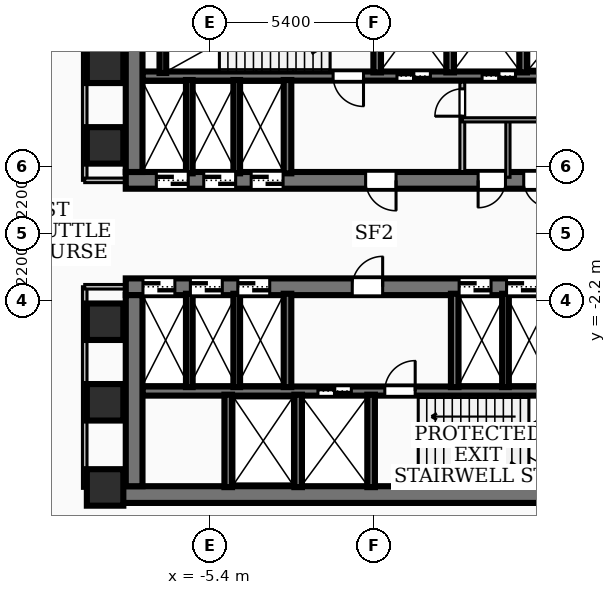
"""IFC4 building model, lengths in metres.
Left out: names, types, materials, properties, quantities, classifications, styles, units other than length and angle.
Written with IfcOpenShell. Run it as: python <this file> out.ifc"""

import sys

from ifc_helpers import new_model, si_unit, direction, frame, frame_2d, origin, origin_2d, place, context, subcontext, project, spatial, rectangle, extrude, element, fill, save


model = new_model("IFC4")
c1 = context("Model", 3, precision=1e-05, world=origin(), true_north=direction((0.0, 1.0)))
c2 = subcontext(c1, "Body", "Model", "MODEL_VIEW")
j1 = project(units=[si_unit("LENGTHUNIT", "METRE"), si_unit("PLANEANGLEUNIT", "RADIAN")], contexts=[c1])
p1 = place(None, origin())
s1 = spatial("IfcSite", under=j1, at=p1, CompositionType="ELEMENT")
p2 = place(p1, origin())
s2 = spatial("IfcBuilding", under=s1, at=p2, CompositionType="ELEMENT")
p3 = place(p2, frame((0.0, 0.0, 19.44)))
s3 = spatial("IfcBuildingStorey", under=s2, at=p3, CompositionType="ELEMENT", Elevation=19.44)
p4 = place(p3, frame((8.17, 1.75, 0.0), z_axis=(0.0, 0.0, 1.0), x_axis=(-1.0, 0.0, 0.0)))
e1 = element("IfcWall", 1, at=p4, inside=s3, PredefinedType="SHEAR", context=c2, shape_type="SweptSolid", body=[
    extrude(rectangle(XDim=16.34, YDim=0.55, at=frame_2d((8.17, 0.0))), origin(), (0.0, 0.0, 1.0), 4.78),
])
p5 = place(p4, frame((7.45, 0.0, 0.0)))
e2 = element("IfcOpeningElement", 2, at=p5, cuts=e1, PredefinedType="OPENING", context=c2, shape_type="SweptSolid", body=[
    extrude(rectangle(XDim=1.0, YDim=2.1, at=frame_2d((0.5, 1.05))), frame((0.0, 0.285, 0.0), z_axis=(0.0, -1.0, 0.0), x_axis=(1.0, 0.0, 0.0)), (0.0, 0.0, 1.0), 0.57),
])
p6 = place(p4, frame((14.285, 0.0, 0.0)))
e3 = element("IfcOpeningElement", 3, at=p6, cuts=e1, PredefinedType="OPENING", context=c2, shape_type="SweptSolid", body=[
    extrude(rectangle(XDim=1.05, YDim=2.15, at=frame_2d((0.525, 1.075))), frame((0.0, 0.285, 0.0), z_axis=(0.0, -1.0, 0.0), x_axis=(1.0, 0.0, 0.0)), (0.0, 0.0, 1.0), 0.57),
])
p7 = place(p4, frame((12.725, 0.0, 0.0)))
e4 = element("IfcOpeningElement", 4, at=p7, cuts=e1, PredefinedType="OPENING", context=c2, shape_type="SweptSolid", body=[
    extrude(rectangle(XDim=1.05, YDim=2.15, at=frame_2d((0.525, 1.075))), frame((0.0, 0.285, 0.0), z_axis=(0.0, -1.0, 0.0), x_axis=(1.0, 0.0, 0.0)), (0.0, 0.0, 1.0), 0.57),
])
p8 = place(p4, frame((11.165, 0.0, 0.0)))
e5 = element("IfcOpeningElement", 5, at=p8, cuts=e1, PredefinedType="OPENING", context=c2, shape_type="SweptSolid", body=[
    extrude(rectangle(XDim=1.05, YDim=2.15, at=frame_2d((0.525, 1.075))), frame((0.0, 0.285, 0.0), z_axis=(0.0, -1.0, 0.0), x_axis=(1.0, 0.0, 0.0)), (0.0, 0.0, 1.0), 0.57),
])
p9 = place(p4, frame((3.85, 0.0, 0.0)))
e6 = element("IfcOpeningElement", 6, at=p9, cuts=e1, PredefinedType="OPENING", context=c2, shape_type="SweptSolid", body=[
    extrude(rectangle(XDim=0.9, YDim=2.06, at=frame_2d((0.45, 1.03))), frame((0.0, 0.285, 0.0), z_axis=(0.0, -1.0, 0.0), x_axis=(1.0, 0.0, 0.0)), (0.0, 0.0, 1.0), 0.57),
])
p10 = place(p4, frame((2.35, 0.0, 0.0)))
e7 = element("IfcOpeningElement", 7, at=p10, cuts=e1, PredefinedType="OPENING", context=c2, shape_type="SweptSolid", body=[
    extrude(rectangle(XDim=0.9, YDim=2.06, at=frame_2d((0.45, 1.03))), frame((0.0, 0.285, 0.0), z_axis=(0.0, -1.0, 0.0), x_axis=(1.0, 0.0, 0.0)), (0.0, 0.0, 1.0), 0.57),
])
p11 = place(p4, frame((0.8, 0.0, 0.0)))
e8 = element("IfcOpeningElement", 8, at=p11, cuts=e1, PredefinedType="OPENING", context=c2, shape_type="SweptSolid", body=[
    extrude(rectangle(XDim=0.9, YDim=2.06, at=frame_2d((0.45, 1.03))), frame((0.0, 0.285, 0.0), z_axis=(0.0, -1.0, 0.0), x_axis=(1.0, 0.0, 0.0)), (0.0, 0.0, 1.0), 0.57),
])
p12 = place(p3, frame((-7.895, 2.025, 0.0), z_axis=(0.0, 0.0, 1.0), x_axis=(0.0, 1.0, 0.0)))
e9 = element("IfcWall", 9, at=p12, inside=s3, PredefinedType="SHEAR", context=c2, shape_type="SweptSolid", body=[
    extrude(rectangle(XDim=6.285, YDim=0.55, at=frame_2d((3.143, 0.0))), origin(), (0.0, 0.0, 1.0), 4.78),
])
p13 = place(p3, frame((7.62, 5.18, 0.0), z_axis=(0.0, 0.0, 1.0), x_axis=(-1.0, 0.0, 0.0)))
e10 = element("IfcWall", 10, at=p13, inside=s3, PredefinedType="SOLIDWALL", context=c2, shape_type="SweptSolid", body=[
    extrude(rectangle(XDim=15.24, YDim=0.3, at=frame_2d((7.62, 0.0))), origin(), (0.0, 0.0, 1.0), 4.78),
])
p14 = place(p13, frame((5.77, 0.0, 0.0)))
e11 = element("IfcOpeningElement", 11, at=p14, cuts=e10, PredefinedType="OPENING", context=c2, shape_type="SweptSolid", body=[
    extrude(rectangle(XDim=1.1, YDim=2.15, at=frame_2d((0.55, 1.075))), frame((0.0, 0.16, 0.0), z_axis=(0.0, -1.0, 0.0), x_axis=(1.0, 0.0, 0.0)), (0.0, 0.0, 1.0), 0.32),
])
p15 = place(p13, frame((2.97, 0.0, 0.0)))
e12 = element("IfcOpeningElement", 12, at=p15, cuts=e10, PredefinedType="OPENING", context=c2, shape_type="SweptSolid", body=[
    extrude(rectangle(XDim=1.1, YDim=2.15, at=frame_2d((0.55, 1.075))), frame((0.0, 0.16, 0.0), z_axis=(0.0, -1.0, 0.0), x_axis=(1.0, 0.0, 0.0)), (0.0, 0.0, 1.0), 0.32),
])
p16 = place(p13, frame((7.97, 0.0, 0.0)))
e13 = element("IfcOpeningElement", 13, at=p16, cuts=e10, PredefinedType="OPENING", context=c2, shape_type="SweptSolid", body=[
    extrude(rectangle(XDim=1.0, YDim=2.1, at=frame_2d((0.5, 1.05))), frame((0.0, 0.16, 0.0), z_axis=(0.0, -1.0, 0.0), x_axis=(1.0, 0.0, 0.0)), (0.0, 0.0, 1.0), 0.32),
])
p17 = place(p3, frame((8.78, -8.585, 0.0), z_axis=(0.0, 0.0, 1.0), x_axis=(-1.0, 0.0, 0.0)))
e14 = element("IfcWall", 14, at=p17, inside=s3, PredefinedType="SHEAR", context=c2, shape_type="SweptSolid", body=[
    extrude(rectangle(XDim=17.56, YDim=0.55, at=frame_2d((8.78, 0.0))), origin(), (0.0, 0.0, 1.0), 4.78),
])
p18 = place(p3, frame((-8.17, -1.75, 0.0), z_axis=(0.0, 0.0, 1.0), x_axis=(1.0, 0.0, 0.0)))
e15 = element("IfcWall", 15, at=p18, inside=s3, PredefinedType="SHEAR", context=c2, shape_type="SweptSolid", body=[
    extrude(rectangle(XDim=16.34, YDim=0.55, at=frame_2d((8.17, 0.0))), origin(), (0.0, 0.0, 1.0), 4.78),
])
p19 = place(p18, frame((7.45, 0.0, 0.0)))
e16 = element("IfcOpeningElement", 16, at=p19, cuts=e15, PredefinedType="OPENING", context=c2, shape_type="SweptSolid", body=[
    extrude(rectangle(XDim=1.0, YDim=2.1, at=frame_2d((0.5, 1.05))), frame((0.0, 0.285, 0.0), z_axis=(0.0, -1.0, 0.0), x_axis=(1.0, 0.0, 0.0)), (0.0, 0.0, 1.0), 0.57),
])
p20 = place(p18, frame((10.965, 0.0, 0.0)))
e17 = element("IfcOpeningElement", 17, at=p20, cuts=e15, PredefinedType="OPENING", context=c2, shape_type="SweptSolid", body=[
    extrude(rectangle(XDim=1.05, YDim=2.15, at=frame_2d((0.525, 1.075))), frame((0.0, 0.285, 0.0), z_axis=(0.0, -1.0, 0.0), x_axis=(1.0, 0.0, 0.0)), (0.0, 0.0, 1.0), 0.57),
])
p21 = place(p18, frame((12.525, 0.0, 0.0)))
e18 = element("IfcOpeningElement", 18, at=p21, cuts=e15, PredefinedType="OPENING", context=c2, shape_type="SweptSolid", body=[
    extrude(rectangle(XDim=1.05, YDim=2.15, at=frame_2d((0.525, 1.075))), frame((0.0, 0.285, 0.0), z_axis=(0.0, -1.0, 0.0), x_axis=(1.0, 0.0, 0.0)), (0.0, 0.0, 1.0), 0.57),
])
p22 = place(p18, frame((14.085, 0.0, 0.0)))
e19 = element("IfcOpeningElement", 19, at=p22, cuts=e15, PredefinedType="OPENING", context=c2, shape_type="SweptSolid", body=[
    extrude(rectangle(XDim=1.05, YDim=2.15, at=frame_2d((0.525, 1.075))), frame((0.0, 0.285, 0.0), z_axis=(0.0, -1.0, 0.0), x_axis=(1.0, 0.0, 0.0)), (0.0, 0.0, 1.0), 0.57),
])
p23 = place(p18, frame((0.565, 0.0, 0.0)))
e20 = element("IfcOpeningElement", 20, at=p23, cuts=e15, PredefinedType="OPENING", context=c2, shape_type="SweptSolid", body=[
    extrude(rectangle(XDim=1.05, YDim=2.15, at=frame_2d((0.525, 1.075))), frame((0.0, 0.285, 0.0), z_axis=(0.0, -1.0, 0.0), x_axis=(1.0, 0.0, 0.0)), (0.0, 0.0, 1.0), 0.57),
])
p24 = place(p18, frame((2.125, 0.0, 0.0)))
e21 = element("IfcOpeningElement", 21, at=p24, cuts=e15, PredefinedType="OPENING", context=c2, shape_type="SweptSolid", body=[
    extrude(rectangle(XDim=1.05, YDim=2.15, at=frame_2d((0.525, 1.075))), frame((0.0, 0.285, 0.0), z_axis=(0.0, -1.0, 0.0), x_axis=(1.0, 0.0, 0.0)), (0.0, 0.0, 1.0), 0.57),
])
p25 = place(p18, frame((3.685, 0.0, 0.0)))
e22 = element("IfcOpeningElement", 22, at=p25, cuts=e15, PredefinedType="OPENING", context=c2, shape_type="SweptSolid", body=[
    extrude(rectangle(XDim=1.05, YDim=2.15, at=frame_2d((0.525, 1.075))), frame((0.0, 0.285, 0.0), z_axis=(0.0, -1.0, 0.0), x_axis=(1.0, 0.0, 0.0)), (0.0, 0.0, 1.0), 0.57),
])
p26 = place(p3, frame((-7.895, -8.31, 0.0), z_axis=(0.0, 0.0, 1.0), x_axis=(0.0, 1.0, 0.0)))
e23 = element("IfcWall", 23, at=p26, inside=s3, PredefinedType="SHEAR", context=c2, shape_type="SweptSolid", body=[
    extrude(rectangle(XDim=6.285, YDim=0.55, at=frame_2d((3.143, 0.0))), origin(), (0.0, 0.0, 1.0), 4.78),
])
p27 = place(p3, frame((-7.62, -5.18, 0.0), z_axis=(0.0, 0.0, 1.0), x_axis=(1.0, 0.0, 0.0)))
e24 = element("IfcWall", 24, at=p27, inside=s3, PredefinedType="SOLIDWALL", context=c2, shape_type="SweptSolid", body=[
    extrude(rectangle(XDim=15.24, YDim=0.3, at=frame_2d((7.62, 0.0))), origin(), (0.0, 0.0, 1.0), 4.78),
])
p28 = place(p27, frame((5.77, 0.0, 0.0)))
e25 = element("IfcOpeningElement", 25, at=p28, cuts=e24, PredefinedType="OPENING", context=c2, shape_type="SweptSolid", body=[
    extrude(rectangle(XDim=1.1, YDim=2.15, at=frame_2d((0.55, 1.075))), frame((0.0, 0.16, 0.0), z_axis=(0.0, -1.0, 0.0), x_axis=(1.0, 0.0, 0.0)), (0.0, 0.0, 1.0), 0.32),
])
p29 = place(p27, frame((7.97, 0.0, 0.0)))
e26 = element("IfcOpeningElement", 26, at=p29, cuts=e24, PredefinedType="OPENING", context=c2, shape_type="SweptSolid", body=[
    extrude(rectangle(XDim=1.0, YDim=2.1, at=frame_2d((0.5, 1.05))), frame((0.0, 0.16, 0.0), z_axis=(0.0, -1.0, 0.0), x_axis=(1.0, 0.0, 0.0)), (0.0, 0.0, 1.0), 0.32),
])
p30 = place(p3, frame((-6.95, 5.28, 0.0), z_axis=(0.0, 0.0, 1.0), x_axis=(0.0, 1.0, 0.0)))
e27 = element("IfcWall", 27, at=p30, inside=s3, PredefinedType="SOLIDWALL", context=c2, shape_type="SweptSolid", body=[
    extrude(rectangle(XDim=3.06, YDim=0.22, at=frame_2d((1.53, 0.0))), origin(), (0.0, 0.0, 1.0), 4.78),
])
for number, where, z_axis, x_axis in (
    (28, (0.1, 5.3, 0.0), (0.0, 0.0, 1.0), (0.0, 1.0, 0.0)),
    (29, (2.5, 5.3, 0.0), (0.0, 0.0, 1.0), (0.0, 1.0, 0.0)),
    (30, (4.9, 5.3, 0.0), (0.0, 0.0, 1.0), (0.0, 1.0, 0.0)),
):
    element("IfcWall", number, at=place(p3, frame(where, z_axis=z_axis, x_axis=x_axis)), inside=s3, PredefinedType="SOLIDWALL", context=c2, shape_type="SweptSolid", body=[
        extrude(rectangle(XDim=3.04, YDim=0.25, at=frame_2d((1.52, 0.0))), origin(), (0.0, 0.0, 1.0), 4.78),
    ])
p31 = place(p3, frame((-2.85, 1.98, 0.0), z_axis=(0.0, 0.0, 1.0), x_axis=(0.0, 1.0, 0.0)))
e31 = element("IfcWall", 31, at=p31, inside=s3, PredefinedType="SOLIDWALL", context=c2, shape_type="SweptSolid", body=[
    extrude(rectangle(XDim=3.07, YDim=0.25, at=frame_2d((1.535, 0.0))), origin(), (0.0, 0.0, 1.0), 4.78),
])
for number, where, z_axis, x_axis in (
    (32, (-0.1, -8.34, 0.0), (0.0, 0.0, 1.0), (0.0, 1.0, 0.0)),
    (33, (-2.5, -8.34, 0.0), (0.0, 0.0, 1.0), (0.0, 1.0, 0.0)),
    (34, (-4.8, -8.34, 0.0), (0.0, 0.0, 1.0), (0.0, 1.0, 0.0)),
):
    element("IfcWall", number, at=place(p3, frame(where, z_axis=z_axis, x_axis=x_axis)), inside=s3, PredefinedType="SOLIDWALL", context=c2, shape_type="SweptSolid", body=[
        extrude(rectangle(XDim=3.04, YDim=0.25, at=frame_2d((1.52, 0.0))), origin(), (0.0, 0.0, 1.0), 4.78),
    ])
for number, where, z_axis, x_axis in (
    (35, (-2.85, -5.05, 0.0), (0.0, 0.0, 1.0), (0.0, 1.0, 0.0)),
    (36, (2.65, -5.05, 0.0), (0.0, 0.0, 1.0), (0.0, 1.0, 0.0)),
):
    element("IfcWall", number, at=place(p3, frame(where, z_axis=z_axis, x_axis=x_axis)), inside=s3, PredefinedType="SOLIDWALL", context=c2, shape_type="SweptSolid", body=[
        extrude(rectangle(XDim=3.07, YDim=0.25, at=frame_2d((1.535, 0.0))), origin(), (0.0, 0.0, 1.0), 4.78),
    ])
for number, where, z_axis, x_axis in (
    (37, (-6.08, 1.98, 0.0), (0.0, 0.0, 1.0), (0.0, 1.0, 0.0)),
    (38, (-4.52, 1.98, 0.0), (0.0, 0.0, 1.0), (0.0, 1.0, 0.0)),
    (39, (4.32, -5.05, 0.0), (0.0, 0.0, 1.0), (0.0, 1.0, 0.0)),
    (40, (-6.08, -5.05, 0.0), (0.0, 0.0, 1.0), (0.0, 1.0, 0.0)),
    (41, (-4.52, -5.05, 0.0), (0.0, 0.0, 1.0), (0.0, 1.0, 0.0)),
):
    element("IfcWall", number, at=place(p3, frame(where, z_axis=z_axis, x_axis=x_axis)), inside=s3, PredefinedType="SOLIDWALL", context=c2, shape_type="SweptSolid", body=[
        extrude(rectangle(XDim=3.07, YDim=0.22, at=frame_2d((1.535, 0.0))), origin(), (0.0, 0.0, 1.0), 4.78),
    ])
for number, where, z_axis, x_axis in (
    (42, (-8.85, -5.55, 0.0), (0.0, 0.0, 1.0), (1.0, 0.0, 0.0)),
    (43, (-8.85, -2.9, 0.0), (0.0, 0.0, 1.0), (1.0, 0.0, 0.0)),
    (44, (-8.85, 2.9, 0.0), (0.0, 0.0, 1.0), (1.0, 0.0, 0.0)),
    (45, (-8.85, 5.55, 0.0), (0.0, 0.0, 1.0), (1.0, 0.0, 0.0)),
    (46, (-8.85, -8.35, 0.0), (0.0, 0.0, 1.0), (1.0, 0.0, 0.0)),
):
    element("IfcColumn", number, at=place(p3, frame(where, z_axis=z_axis, x_axis=x_axis)), inside=s3, PredefinedType="COLUMN", context=c2, shape_type="SweptSolid", body=[
        extrude(rectangle(XDim=1.2, YDim=1.2, at=origin_2d()), origin(), (0.0, 0.0, 1.0), 5.04),
    ])
p32 = place(p3, frame((2.9, 2.04, 0.0), z_axis=(0.0, 0.0, 1.0), x_axis=(0.0, 1.0, 0.0)))
e47 = element("IfcWall", 47, at=p32, inside=s3, PredefinedType="PARTITIONING", context=c2, shape_type="SweptSolid", body=[
    extrude(rectangle(XDim=2.94, YDim=0.16, at=frame_2d((1.47, 0.0))), origin(), (0.0, 0.0, 1.0), 3.845),
])
p33 = place(p32, frame((1.82, 0.0, 0.0)))
e48 = element("IfcOpeningElement", 48, at=p33, cuts=e47, PredefinedType="OPENING", context=c2, shape_type="SweptSolid", body=[
    extrude(rectangle(XDim=0.9, YDim=2.06, at=frame_2d((0.45, 1.03))), frame((0.0, 0.09, 0.0), z_axis=(0.0, -1.0, 0.0), x_axis=(1.0, 0.0, 0.0)), (0.0, 0.0, 1.0), 0.18),
])
p34 = place(p3, frame((2.9, 3.74, 0.0), z_axis=(0.0, 0.0, 1.0), x_axis=(1.0, 0.0, 0.0)))
e49 = element("IfcWall", 49, at=p34, inside=s3, PredefinedType="PARTITIONING", context=c2, shape_type="SweptSolid", body=[
    extrude(rectangle(XDim=4.65, YDim=0.138, at=frame_2d((2.325, 0.0))), origin(), (0.0, 0.0, 1.0), 4.78),
])
p35 = place(p3, frame((4.4, 1.85, 0.0), z_axis=(0.0, 0.0, 1.0), x_axis=(0.0, 1.0, 0.0)))
e50 = element("IfcWall", 50, at=p35, inside=s3, PredefinedType="PARTITIONING", context=c2, shape_type="SweptSolid", body=[
    extrude(rectangle(XDim=1.89, YDim=0.138, at=frame_2d((0.945, 0.0))), origin(), (0.0, 0.0, 1.0), 3.845),
])
p36 = place(p3, frame((-9.52, 1.75, 0.0), z_axis=(0.0, 0.0, 1.0), x_axis=(0.0, 1.0, 0.0)))
e51 = element("IfcWall", 51, at=p36, inside=s3, PredefinedType="PARTITIONING", context=c2, shape_type="SweptSolid", body=[
    extrude(rectangle(XDim=6.63, YDim=0.15, at=frame_2d((3.315, 0.0))), origin(), (0.0, 0.0, 1.0), 2.572),
])
p37 = place(p3, frame((-7.85, 1.75, 0.0), z_axis=(0.0, 0.0, 1.0), x_axis=(-1.0, 0.0, 0.0)))
e52 = element("IfcWall", 52, at=p37, inside=s3, PredefinedType="PARTITIONING", context=c2, shape_type="SweptSolid", body=[
    extrude(rectangle(XDim=1.67, YDim=0.15, at=frame_2d((0.835, 0.0))), origin(), (0.0, 0.0, 1.0), 3.845),
])
p38 = place(p3, frame((-9.52, -8.38, 0.0), z_axis=(0.0, 0.0, 1.0), x_axis=(0.0, 1.0, 0.0)))
e53 = element("IfcWall", 53, at=p38, inside=s3, PredefinedType="PARTITIONING", context=c2, shape_type="SweptSolid", body=[
    extrude(rectangle(XDim=6.63, YDim=0.15, at=frame_2d((3.315, 0.0))), origin(), (0.0, 0.0, 1.0), 2.572),
])
p39 = place(p3, frame((-7.85, -1.75, 0.0), z_axis=(0.0, 0.0, 1.0), x_axis=(-1.0, 0.0, 0.0)))
e54 = element("IfcWall", 54, at=p39, inside=s3, PredefinedType="PARTITIONING", context=c2, shape_type="SweptSolid", body=[
    extrude(rectangle(XDim=1.67, YDim=0.15, at=frame_2d((0.835, 0.0))), origin(), (0.0, 0.0, 1.0), 3.845),
])
p40 = place(p5, origin())
e55 = element("IfcDoor", 55, at=p40, inside=s3, OperationType="SINGLE_SWING_LEFT", PredefinedType="DOOR", context=c2, shape_type="SweptSolid", body=[
    extrude(rectangle(XDim=1.0, YDim=2.1, at=frame_2d((0.5, 1.05))), frame((0.0, 0.025, 0.0), z_axis=(0.0, -1.0, 0.0), x_axis=(1.0, 0.0, 0.0)), (0.0, 0.0, 1.0), 0.05),
])
fill(e2, e55)
p41 = place(p19, origin())
e56 = element("IfcDoor", 56, at=p41, inside=s3, OperationType="SINGLE_SWING_RIGHT", PredefinedType="DOOR", context=c2, shape_type="SweptSolid", body=[
    extrude(rectangle(XDim=1.0, YDim=2.1, at=frame_2d((0.5, 1.05))), frame((0.0, 0.025, 0.0), z_axis=(0.0, -1.0, 0.0), x_axis=(1.0, 0.0, 0.0)), (0.0, 0.0, 1.0), 0.05),
])
fill(e16, e56)
p42 = place(p14, origin())
e57 = element("IfcDoor", 57, at=p42, inside=s3, OperationType="DOUBLE_DOOR_SLIDING", PredefinedType="DOOR", context=c2, shape_type="SweptSolid", body=[
    extrude(rectangle(XDim=1.1, YDim=2.15, at=frame_2d((0.55, 1.075))), frame((0.0, 0.025, 0.0), z_axis=(0.0, -1.0, 0.0), x_axis=(1.0, 0.0, 0.0)), (0.0, 0.0, 1.0), 0.05),
])
fill(e11, e57)
p43 = place(p15, origin())
e58 = element("IfcDoor", 58, at=p43, inside=s3, OperationType="DOUBLE_DOOR_SLIDING", PredefinedType="DOOR", context=c2, shape_type="SweptSolid", body=[
    extrude(rectangle(XDim=1.1, YDim=2.15, at=frame_2d((0.55, 1.075))), frame((0.0, 0.025, 0.0), z_axis=(0.0, -1.0, 0.0), x_axis=(1.0, 0.0, 0.0)), (0.0, 0.0, 1.0), 0.05),
])
fill(e12, e58)
p44 = place(p16, origin())
e59 = element("IfcDoor", 59, at=p44, inside=s3, OperationType="SINGLE_SWING_LEFT", PredefinedType="DOOR", context=c2, shape_type="SweptSolid", body=[
    extrude(rectangle(XDim=1.0, YDim=2.1, at=frame_2d((0.5, 1.05))), frame((0.0, 0.025, 0.0), z_axis=(0.0, -1.0, 0.0), x_axis=(1.0, 0.0, 0.0)), (0.0, 0.0, 1.0), 0.05),
])
fill(e13, e59)
p45 = place(p28, origin())
e60 = element("IfcDoor", 60, at=p45, inside=s3, OperationType="DOUBLE_DOOR_SLIDING", PredefinedType="DOOR", context=c2, shape_type="SweptSolid", body=[
    extrude(rectangle(XDim=1.1, YDim=2.15, at=frame_2d((0.55, 1.075))), frame((0.0, 0.025, 0.0), z_axis=(0.0, -1.0, 0.0), x_axis=(1.0, 0.0, 0.0)), (0.0, 0.0, 1.0), 0.05),
])
fill(e25, e60)
p46 = place(p29, origin())
e61 = element("IfcDoor", 61, at=p46, inside=s3, OperationType="SINGLE_SWING_RIGHT", PredefinedType="DOOR", context=c2, shape_type="SweptSolid", body=[
    extrude(rectangle(XDim=1.0, YDim=2.1, at=frame_2d((0.5, 1.05))), frame((0.0, 0.025, 0.0), z_axis=(0.0, -1.0, 0.0), x_axis=(1.0, 0.0, 0.0)), (0.0, 0.0, 1.0), 0.05),
])
fill(e26, e61)
p47 = place(p6, origin())
e62 = element("IfcDoor", 62, at=p47, inside=s3, OperationType="DOUBLE_DOOR_SLIDING", PredefinedType="DOOR", context=c2, shape_type="SweptSolid", body=[
    extrude(rectangle(XDim=1.05, YDim=2.15, at=frame_2d((0.525, 1.075))), frame((0.0, 0.025, 0.0), z_axis=(0.0, -1.0, 0.0), x_axis=(1.0, 0.0, 0.0)), (0.0, 0.0, 1.0), 0.05),
])
fill(e3, e62)
p48 = place(p7, origin())
e63 = element("IfcDoor", 63, at=p48, inside=s3, OperationType="DOUBLE_DOOR_SLIDING", PredefinedType="DOOR", context=c2, shape_type="SweptSolid", body=[
    extrude(rectangle(XDim=1.05, YDim=2.15, at=frame_2d((0.525, 1.075))), frame((0.0, 0.025, 0.0), z_axis=(0.0, -1.0, 0.0), x_axis=(1.0, 0.0, 0.0)), (0.0, 0.0, 1.0), 0.05),
])
fill(e4, e63)
p49 = place(p8, origin())
e64 = element("IfcDoor", 64, at=p49, inside=s3, OperationType="DOUBLE_DOOR_SLIDING", PredefinedType="DOOR", context=c2, shape_type="SweptSolid", body=[
    extrude(rectangle(XDim=1.05, YDim=2.15, at=frame_2d((0.525, 1.075))), frame((0.0, 0.025, 0.0), z_axis=(0.0, -1.0, 0.0), x_axis=(1.0, 0.0, 0.0)), (0.0, 0.0, 1.0), 0.05),
])
fill(e5, e64)
p50 = place(p20, origin())
e65 = element("IfcDoor", 65, at=p50, inside=s3, OperationType="DOUBLE_DOOR_SLIDING", PredefinedType="DOOR", context=c2, shape_type="SweptSolid", body=[
    extrude(rectangle(XDim=1.05, YDim=2.15, at=frame_2d((0.525, 1.075))), frame((0.0, 0.025, 0.0), z_axis=(0.0, -1.0, 0.0), x_axis=(1.0, 0.0, 0.0)), (0.0, 0.0, 1.0), 0.05),
])
fill(e17, e65)
p51 = place(p21, origin())
e66 = element("IfcDoor", 66, at=p51, inside=s3, OperationType="DOUBLE_DOOR_SLIDING", PredefinedType="DOOR", context=c2, shape_type="SweptSolid", body=[
    extrude(rectangle(XDim=1.05, YDim=2.15, at=frame_2d((0.525, 1.075))), frame((0.0, 0.025, 0.0), z_axis=(0.0, -1.0, 0.0), x_axis=(1.0, 0.0, 0.0)), (0.0, 0.0, 1.0), 0.05),
])
fill(e18, e66)
p52 = place(p23, origin())
e67 = element("IfcDoor", 67, at=p52, inside=s3, OperationType="DOUBLE_DOOR_SLIDING", PredefinedType="DOOR", context=c2, shape_type="SweptSolid", body=[
    extrude(rectangle(XDim=1.05, YDim=2.15, at=frame_2d((0.525, 1.075))), frame((0.0, 0.025, 0.0), z_axis=(0.0, -1.0, 0.0), x_axis=(1.0, 0.0, 0.0)), (0.0, 0.0, 1.0), 0.05),
])
fill(e20, e67)
p53 = place(p24, origin())
e68 = element("IfcDoor", 68, at=p53, inside=s3, OperationType="DOUBLE_DOOR_SLIDING", PredefinedType="DOOR", context=c2, shape_type="SweptSolid", body=[
    extrude(rectangle(XDim=1.05, YDim=2.15, at=frame_2d((0.525, 1.075))), frame((0.0, 0.025, 0.0), z_axis=(0.0, -1.0, 0.0), x_axis=(1.0, 0.0, 0.0)), (0.0, 0.0, 1.0), 0.05),
])
fill(e21, e68)
p54 = place(p25, origin())
e69 = element("IfcDoor", 69, at=p54, inside=s3, OperationType="DOUBLE_DOOR_SLIDING", PredefinedType="DOOR", context=c2, shape_type="SweptSolid", body=[
    extrude(rectangle(XDim=1.05, YDim=2.15, at=frame_2d((0.525, 1.075))), frame((0.0, 0.025, 0.0), z_axis=(0.0, -1.0, 0.0), x_axis=(1.0, 0.0, 0.0)), (0.0, 0.0, 1.0), 0.05),
])
fill(e22, e69)
p55 = place(p9, origin())
e70 = element("IfcDoor", 70, at=p55, inside=s3, OperationType="SINGLE_SWING_RIGHT", PredefinedType="DOOR", context=c2, shape_type="SweptSolid", body=[
    extrude(rectangle(XDim=0.9, YDim=2.06, at=frame_2d((0.45, 1.03))), frame((0.0, 0.025, 0.0), z_axis=(0.0, -1.0, 0.0), x_axis=(1.0, 0.0, 0.0)), (0.0, 0.0, 1.0), 0.05),
])
fill(e6, e70)
p56 = place(p10, origin())
e71 = element("IfcDoor", 71, at=p56, inside=s3, OperationType="SINGLE_SWING_LEFT", PredefinedType="DOOR", context=c2, shape_type="SweptSolid", body=[
    extrude(rectangle(XDim=0.9, YDim=2.06, at=frame_2d((0.45, 1.03))), frame((0.0, 0.025, 0.0), z_axis=(0.0, -1.0, 0.0), x_axis=(1.0, 0.0, 0.0)), (0.0, 0.0, 1.0), 0.05),
])
fill(e7, e71)
p57 = place(p33, origin())
e72 = element("IfcDoor", 72, at=p57, inside=s3, OperationType="SINGLE_SWING_LEFT", PredefinedType="DOOR", context=c2, shape_type="SweptSolid", body=[
    extrude(rectangle(XDim=0.9, YDim=2.06, at=frame_2d((0.45, 1.03))), frame((0.0, 0.025, 0.0), z_axis=(0.0, -1.0, 0.0), x_axis=(1.0, 0.0, 0.0)), (0.0, 0.0, 1.0), 0.05),
])
fill(e48, e72)
save(model, sys.argv[1])
